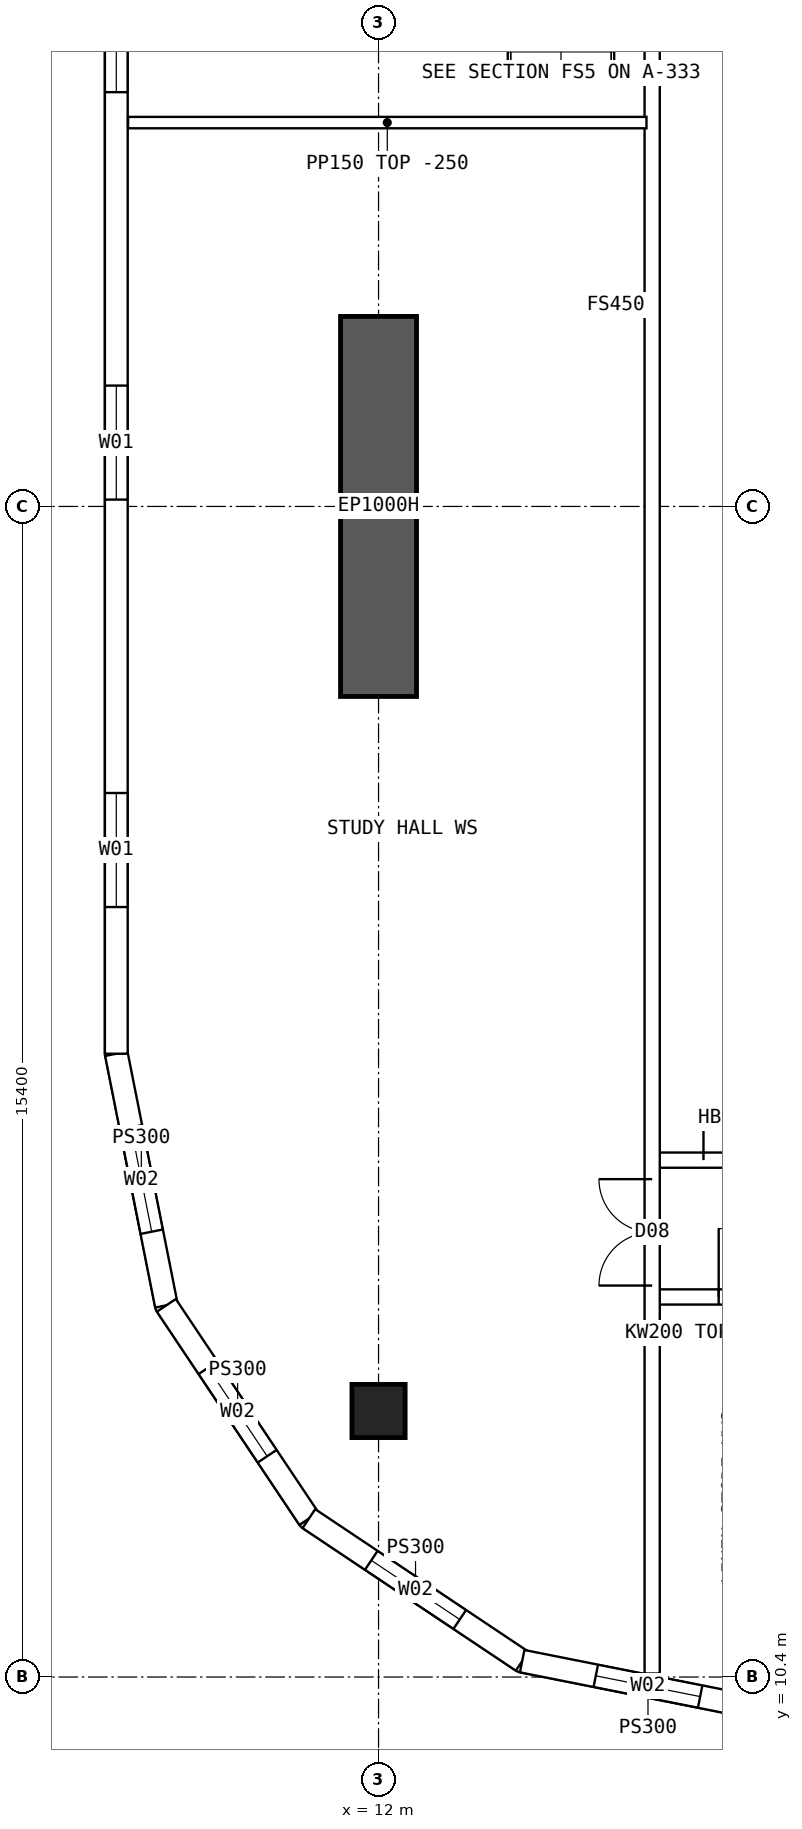
"""IFC4 building model, lengths in metres.
Left out: names, types, materials, properties, quantities, classifications, styles, units other than length and angle.
Written with IfcOpenShell. Run it as: python <this file> out.ifc"""

import sys

from ifc_helpers import new_model, si_unit, direction, frame, frame_2d, origin, origin_2d, place, context, subcontext, project, spatial, polyline, rectangle, hollow_rectangle, outline, extrude, element, fill, save


model = new_model("IFC4")
c1 = context("Model", 3, precision=1e-05, world=origin(), true_north=direction((0.0, 1.0)))
c2 = subcontext(c1, "Body", "Model", "MODEL_VIEW")
j1 = project(units=[si_unit("LENGTHUNIT", "METRE"), si_unit("PLANEANGLEUNIT", "RADIAN")], contexts=[c1])
p1 = place(None, origin())
s1 = spatial("IfcSite", under=j1, at=p1, CompositionType="ELEMENT")
p2 = place(p1, origin())
s2 = spatial("IfcBuilding", under=s1, at=p2, CompositionType="ELEMENT")
p3 = place(p2, frame((0.0, 0.0, 178.6)))
s3 = spatial("IfcBuildingStorey", under=s2, at=p3, CompositionType="ELEMENT", Elevation=178.6)
p4 = place(p3, frame((12.0, 13.9, 0.0), z_axis=(0.0, 0.0, 1.0), x_axis=(1.0, 0.0, 0.0)))
e1 = element("IfcColumn", 1, at=p4, inside=s3, PredefinedType="COLUMN", context=c2, shape_type="SweptSolid", body=[
    extrude(hollow_rectangle(XDim=0.7, YDim=0.7, WallThickness=0.07, at=origin_2d()), origin(), (0.0, 0.0, 1.0), 3.75),
])
p5 = place(p3, frame((12.0, 23.3, 0.0), z_axis=(0.0, 0.0, 1.0), x_axis=(0.0, 1.0, 0.0)))
e2 = element("IfcWall", 2, at=p5, inside=s3, PredefinedType="SHEAR", context=c2, shape_type="SweptSolid", body=[
    extrude(rectangle(XDim=5.0, YDim=1.0, at=frame_2d((2.5, 0.0))), origin(), (0.0, 0.0, 1.0), 3.75),
])
p6 = place(p3, frame((8.55, 45.4, 0.0), z_axis=(0.0, 0.0, 1.0), x_axis=(0.0, -1.0, 0.0)))
e3 = element("IfcWall", 3, at=p6, inside=s3, PredefinedType="SOLIDWALL", context=c2, shape_type="SweptSolid", body=[
    extrude(outline(polyline([(-0.015, -0.15), (26.815, -0.15), (26.785, 0.15), (0.015, 0.15), (-0.015, -0.15)])), origin(), (0.0, 0.0, 1.0), 3.5),
])
p7 = place(p6, frame((1.93, 0.0, 0.9)))
e4 = element("IfcOpeningElement", 4, at=p7, cuts=e3, PredefinedType="OPENING", context=c2, shape_type="SweptSolid", body=[
    extrude(rectangle(XDim=1.5, YDim=2.0, at=frame_2d((0.75, 1.0))), frame((0.0, 0.16, 0.0), z_axis=(0.0, -1.0, 0.0), x_axis=(1.0, 0.0, 0.0)), (0.0, 0.0, 1.0), 0.32),
])
p8 = place(p6, frame((7.29, 0.0, 0.9)))
e5 = element("IfcOpeningElement", 5, at=p8, cuts=e3, PredefinedType="OPENING", context=c2, shape_type="SweptSolid", body=[
    extrude(rectangle(XDim=1.5, YDim=2.0, at=frame_2d((0.75, 1.0))), frame((0.0, 0.16, 0.0), z_axis=(0.0, -1.0, 0.0), x_axis=(1.0, 0.0, 0.0)), (0.0, 0.0, 1.0), 0.32),
])
p9 = place(p6, frame((12.65, 0.0, 0.9)))
e6 = element("IfcOpeningElement", 6, at=p9, cuts=e3, PredefinedType="OPENING", context=c2, shape_type="SweptSolid", body=[
    extrude(rectangle(XDim=1.5, YDim=2.0, at=frame_2d((0.75, 1.0))), frame((0.0, 0.16, 0.0), z_axis=(0.0, -1.0, 0.0), x_axis=(1.0, 0.0, 0.0)), (0.0, 0.0, 1.0), 0.32),
])
p10 = place(p6, frame((18.01, 0.0, 0.9)))
e7 = element("IfcOpeningElement", 7, at=p10, cuts=e3, PredefinedType="OPENING", context=c2, shape_type="SweptSolid", body=[
    extrude(rectangle(XDim=1.5, YDim=2.0, at=frame_2d((0.75, 1.0))), frame((0.0, 0.16, 0.0), z_axis=(0.0, -1.0, 0.0), x_axis=(1.0, 0.0, 0.0)), (0.0, 0.0, 1.0), 0.32),
])
p11 = place(p6, frame((23.37, 0.0, 0.9)))
e8 = element("IfcOpeningElement", 8, at=p11, cuts=e3, PredefinedType="OPENING", context=c2, shape_type="SweptSolid", body=[
    extrude(rectangle(XDim=1.5, YDim=2.0, at=frame_2d((0.75, 1.0))), frame((0.0, 0.16, 0.0), z_axis=(0.0, -1.0, 0.0), x_axis=(1.0, 0.0, 0.0)), (0.0, 0.0, 1.0), 0.32),
])
p12 = place(p3, frame((8.55, 18.6, 0.0), z_axis=(0.0, 0.0, 1.0), x_axis=(0.19508664885, -0.980786011034, 0.0)))
e9 = element("IfcWall", 9, at=p12, inside=s3, PredefinedType="SOLIDWALL", context=c2, shape_type="SweptSolid", body=[
    extrude(outline(polyline([(-0.015, -0.15), (3.405, -0.15), (3.345, 0.15), (0.015, 0.15), (-0.015, -0.15)])), origin(), (0.0, 0.0, 1.0), 3.5),
])
p13 = place(p12, frame((0.988, 0.0, 0.9)))
e10 = element("IfcOpeningElement", 10, at=p13, cuts=e9, PredefinedType="OPENING", context=c2, shape_type="SweptSolid", body=[
    extrude(rectangle(XDim=1.4, YDim=1.8, at=frame_2d((0.7, 0.9))), frame((0.0, 0.16, 0.0), z_axis=(0.0, -1.0, 0.0), x_axis=(1.0, 0.0, 0.0)), (0.0, 0.0, 1.0), 0.32),
])
p14 = place(p3, frame((9.208, 15.29, 0.0), z_axis=(0.0, 0.0, 1.0), x_axis=(0.555534554399, -0.831493450887, 0.0)))
e11 = element("IfcWall", 11, at=p14, inside=s3, PredefinedType="SOLIDWALL", context=c2, shape_type="SweptSolid", body=[
    extrude(outline(polyline([(-0.03, -0.15), (3.405, -0.15), (3.345, 0.15), (0.03, 0.15), (-0.03, -0.15)])), origin(), (0.0, 0.0, 1.0), 3.5),
])
p15 = place(p14, frame((0.988, 0.0, 0.9)))
e12 = element("IfcOpeningElement", 12, at=p15, cuts=e11, PredefinedType="OPENING", context=c2, shape_type="SweptSolid", body=[
    extrude(rectangle(XDim=1.4, YDim=1.8, at=frame_2d((0.7, 0.9))), frame((0.0, 0.16, 0.0), z_axis=(0.0, -1.0, 0.0), x_axis=(1.0, 0.0, 0.0)), (0.0, 0.0, 1.0), 0.32),
])
p16 = place(p3, frame((11.083, 12.483, 0.0), z_axis=(0.0, 0.0, 1.0), x_axis=(0.831493450887, -0.555534554399, 0.0)))
e13 = element("IfcWall", 13, at=p16, inside=s3, PredefinedType="SOLIDWALL", context=c2, shape_type="SweptSolid", body=[
    extrude(outline(polyline([(-0.03, -0.15), (3.405, -0.15), (3.345, 0.15), (0.03, 0.15), (-0.03, -0.15)])), origin(), (0.0, 0.0, 1.0), 3.5),
])
p17 = place(p16, frame((0.988, 0.0, 0.9)))
e14 = element("IfcOpeningElement", 14, at=p17, cuts=e13, PredefinedType="OPENING", context=c2, shape_type="SweptSolid", body=[
    extrude(rectangle(XDim=1.4, YDim=1.8, at=frame_2d((0.7, 0.9))), frame((0.0, 0.16, 0.0), z_axis=(0.0, -1.0, 0.0), x_axis=(1.0, 0.0, 0.0)), (0.0, 0.0, 1.0), 0.32),
])
p18 = place(p3, frame((13.89, 10.608, 0.0), z_axis=(0.0, 0.0, 1.0), x_axis=(0.98078325777, -0.195100490205, 0.0)))
e15 = element("IfcWall", 15, at=p18, inside=s3, PredefinedType="SOLIDWALL", context=c2, shape_type="SweptSolid", body=[
    extrude(outline(polyline([(-0.03, -0.15), (3.405, -0.15), (3.345, 0.15), (0.03, 0.15), (-0.03, -0.15)])), origin(), (0.0, 0.0, 1.0), 3.5),
])
p19 = place(p18, frame((0.988, 0.0, 0.9)))
e16 = element("IfcOpeningElement", 16, at=p19, cuts=e15, PredefinedType="OPENING", context=c2, shape_type="SweptSolid", body=[
    extrude(rectangle(XDim=1.4, YDim=1.8, at=frame_2d((0.7, 0.9))), frame((0.0, 0.16, 0.0), z_axis=(0.0, -1.0, 0.0), x_axis=(1.0, 0.0, 0.0)), (0.0, 0.0, 1.0), 0.32),
])
p20 = place(p3, frame((15.6, 15.4, 0.0), z_axis=(0.0, 0.0, 1.0), x_axis=(1.0, 0.0, 0.0)))
e17 = element("IfcWall", 17, at=p20, inside=s3, PredefinedType="SOLIDWALL", context=c2, shape_type="SweptSolid", body=[
    extrude(rectangle(XDim=1.975, YDim=0.2, at=frame_2d((0.987, 0.0))), origin(), (0.0, 0.0, 1.0), 3.5),
])
p21 = place(p20, frame((0.875, 0.0, 0.0)))
e18 = element("IfcOpeningElement", 18, at=p21, cuts=e17, PredefinedType="OPENING", context=c2, shape_type="SweptSolid", body=[
    extrude(rectangle(XDim=0.9, YDim=2.1, at=frame_2d((0.45, 1.05))), frame((0.0, 0.11, 0.0), z_axis=(0.0, -1.0, 0.0), x_axis=(1.0, 0.0, 0.0)), (0.0, 0.0, 1.0), 0.22),
])
p22 = place(p3, frame((15.6, 17.2, 0.0), z_axis=(0.0, 0.0, 1.0), x_axis=(1.0, 0.0, 0.0)))
e19 = element("IfcWall", 19, at=p22, inside=s3, PredefinedType="SOLIDWALL", context=c2, shape_type="SweptSolid", body=[
    extrude(rectangle(XDim=1.975, YDim=0.2, at=frame_2d((0.987, 0.0))), origin(), (0.0, 0.0, 1.0), 3.5),
])
p23 = place(p22, frame((0.675, 0.0, 0.0)))
e20 = element("IfcOpeningElement", 20, at=p23, cuts=e19, PredefinedType="OPENING", context=c2, shape_type="SweptSolid", body=[
    extrude(rectangle(XDim=1.2, YDim=2.1, at=frame_2d((0.6, 1.05))), frame((0.0, 0.11, 0.0), z_axis=(0.0, -1.0, 0.0), x_axis=(1.0, 0.0, 0.0)), (0.0, 0.0, 1.0), 0.22),
])
p24 = place(p3, frame((8.705, 30.85, 0.0), z_axis=(0.0, 0.0, 1.0), x_axis=(1.0, 0.0, 0.0)))
e21 = element("IfcWall", 21, at=p24, inside=s3, PredefinedType="PARTITIONING", context=c2, shape_type="SweptSolid", body=[
    extrude(outline(polyline([(0.0, 0.0), (6.82, 0.0), (6.82, 3.5), (3.597, 3.5), (3.595, 3.05), (2.997, 3.05), (2.995, 3.5), (0.0, 3.5), (0.0, 0.0)])), frame((0.0, 0.075, 0.0), z_axis=(0.0, -1.0, 0.0), x_axis=(1.0, 0.0, 0.0)), (0.0, 0.0, 1.0), 0.15),
])
p25 = place(p3, frame((15.6, 10.446, 0.0), z_axis=(0.0, 0.0, 1.0), x_axis=(0.0, 1.0, 0.0)))
e22 = element("IfcWall", 22, at=p25, inside=s3, PredefinedType="SOLIDWALL", context=c2, shape_type="SweptSolid", body=[
    extrude(rectangle(XDim=43.107, YDim=0.2, at=frame_2d((21.554, 0.0))), origin(), (0.0, 0.0, 1.0), 3.5),
])
p26 = place(p25, frame((5.104, 0.0, 0.0)))
e23 = element("IfcOpeningElement", 23, at=p26, cuts=e22, PredefinedType="OPENING", context=c2, shape_type="SweptSolid", body=[
    extrude(rectangle(XDim=1.4, YDim=2.1, at=frame_2d((0.7, 1.05))), frame((0.0, 0.11, 0.0), z_axis=(0.0, -1.0, 0.0), x_axis=(1.0, 0.0, 0.0)), (0.0, 0.0, 1.0), 0.22),
])
p27 = place(p25, frame((36.504, 0.0, 0.0)))
e24 = element("IfcOpeningElement", 24, at=p27, cuts=e22, PredefinedType="OPENING", context=c2, shape_type="SweptSolid", body=[
    extrude(rectangle(XDim=1.4, YDim=2.1, at=frame_2d((0.7, 1.05))), frame((0.0, 0.11, 0.0), z_axis=(0.0, -1.0, 0.0), x_axis=(1.0, 0.0, 0.0)), (0.0, 0.0, 1.0), 0.22),
])
p28 = place(p9, origin())
e25 = element("IfcWindow", 25, at=p28, inside=s3, PartitioningType="SINGLE_PANEL", PredefinedType="WINDOW", context=c2, shape_type="SweptSolid", body=[
    extrude(rectangle(XDim=1.5, YDim=2.0, at=frame_2d((0.75, 1.0))), frame((0.0, 0.03, 0.0), z_axis=(0.0, -1.0, 0.0), x_axis=(1.0, 0.0, 0.0)), (0.0, 0.0, 1.0), 0.06),
])
fill(e6, e25)
p29 = place(p10, origin())
e26 = element("IfcWindow", 26, at=p29, inside=s3, PartitioningType="SINGLE_PANEL", PredefinedType="WINDOW", context=c2, shape_type="SweptSolid", body=[
    extrude(rectangle(XDim=1.5, YDim=2.0, at=frame_2d((0.75, 1.0))), frame((0.0, 0.03, 0.0), z_axis=(0.0, -1.0, 0.0), x_axis=(1.0, 0.0, 0.0)), (0.0, 0.0, 1.0), 0.06),
])
fill(e7, e26)
p30 = place(p11, origin())
e27 = element("IfcWindow", 27, at=p30, inside=s3, PartitioningType="SINGLE_PANEL", PredefinedType="WINDOW", context=c2, shape_type="SweptSolid", body=[
    extrude(rectangle(XDim=1.5, YDim=2.0, at=frame_2d((0.75, 1.0))), frame((0.0, 0.03, 0.0), z_axis=(0.0, -1.0, 0.0), x_axis=(1.0, 0.0, 0.0)), (0.0, 0.0, 1.0), 0.06),
])
fill(e8, e27)
p31 = place(p13, origin())
e28 = element("IfcWindow", 28, at=p31, inside=s3, PartitioningType="SINGLE_PANEL", PredefinedType="WINDOW", context=c2, shape_type="SweptSolid", body=[
    extrude(rectangle(XDim=1.4, YDim=1.8, at=frame_2d((0.7, 0.9))), frame((0.0, 0.03, 0.0), z_axis=(0.0, -1.0, 0.0), x_axis=(1.0, 0.0, 0.0)), (0.0, 0.0, 1.0), 0.06),
])
fill(e10, e28)
p32 = place(p15, origin())
e29 = element("IfcWindow", 29, at=p32, inside=s3, PartitioningType="SINGLE_PANEL", PredefinedType="WINDOW", context=c2, shape_type="SweptSolid", body=[
    extrude(rectangle(XDim=1.4, YDim=1.8, at=frame_2d((0.7, 0.9))), frame((0.0, 0.03, 0.0), z_axis=(0.0, -1.0, 0.0), x_axis=(1.0, 0.0, 0.0)), (0.0, 0.0, 1.0), 0.06),
])
fill(e12, e29)
p33 = place(p17, origin())
e30 = element("IfcWindow", 30, at=p33, inside=s3, PartitioningType="SINGLE_PANEL", PredefinedType="WINDOW", context=c2, shape_type="SweptSolid", body=[
    extrude(rectangle(XDim=1.4, YDim=1.8, at=frame_2d((0.7, 0.9))), frame((0.0, 0.03, 0.0), z_axis=(0.0, -1.0, 0.0), x_axis=(1.0, 0.0, 0.0)), (0.0, 0.0, 1.0), 0.06),
])
fill(e14, e30)
p34 = place(p19, origin())
e31 = element("IfcWindow", 31, at=p34, inside=s3, PartitioningType="SINGLE_PANEL", PredefinedType="WINDOW", context=c2, shape_type="SweptSolid", body=[
    extrude(rectangle(XDim=1.4, YDim=1.8, at=frame_2d((0.7, 0.9))), frame((0.0, 0.03, 0.0), z_axis=(0.0, -1.0, 0.0), x_axis=(1.0, 0.0, 0.0)), (0.0, 0.0, 1.0), 0.06),
])
fill(e16, e31)
p35 = place(p23, origin())
e32 = element("IfcDoor", 32, at=p35, inside=s3, OperationType="DOUBLE_DOOR_SINGLE_SWING", PredefinedType="DOOR", context=c2, shape_type="SweptSolid", body=[
    extrude(rectangle(XDim=1.2, YDim=2.1, at=frame_2d((0.6, 1.05))), frame((0.0, 0.025, 0.0), z_axis=(0.0, -1.0, 0.0), x_axis=(1.0, 0.0, 0.0)), (0.0, 0.0, 1.0), 0.05),
])
fill(e20, e32)
p36 = place(p26, origin())
e33 = element("IfcDoor", 33, at=p36, inside=s3, OperationType="DOUBLE_DOOR_SINGLE_SWING", PredefinedType="DOOR", context=c2, shape_type="SweptSolid", body=[
    extrude(rectangle(XDim=1.4, YDim=2.1, at=frame_2d((0.7, 1.05))), frame((0.0, 0.025, 0.0), z_axis=(0.0, -1.0, 0.0), x_axis=(1.0, 0.0, 0.0)), (0.0, 0.0, 1.0), 0.05),
])
fill(e23, e33)
p37 = place(p21, origin())
e34 = element("IfcDoor", 34, at=p37, inside=s3, OperationType="SINGLE_SWING_LEFT", PredefinedType="DOOR", context=c2, shape_type="SweptSolid", body=[
    extrude(rectangle(XDim=0.9, YDim=2.1, at=frame_2d((0.45, 1.05))), frame((0.0, 0.025, 0.0), z_axis=(0.0, -1.0, 0.0), x_axis=(1.0, 0.0, 0.0)), (0.0, 0.0, 1.0), 0.05),
])
fill(e18, e34)
save(model, sys.argv[1])
